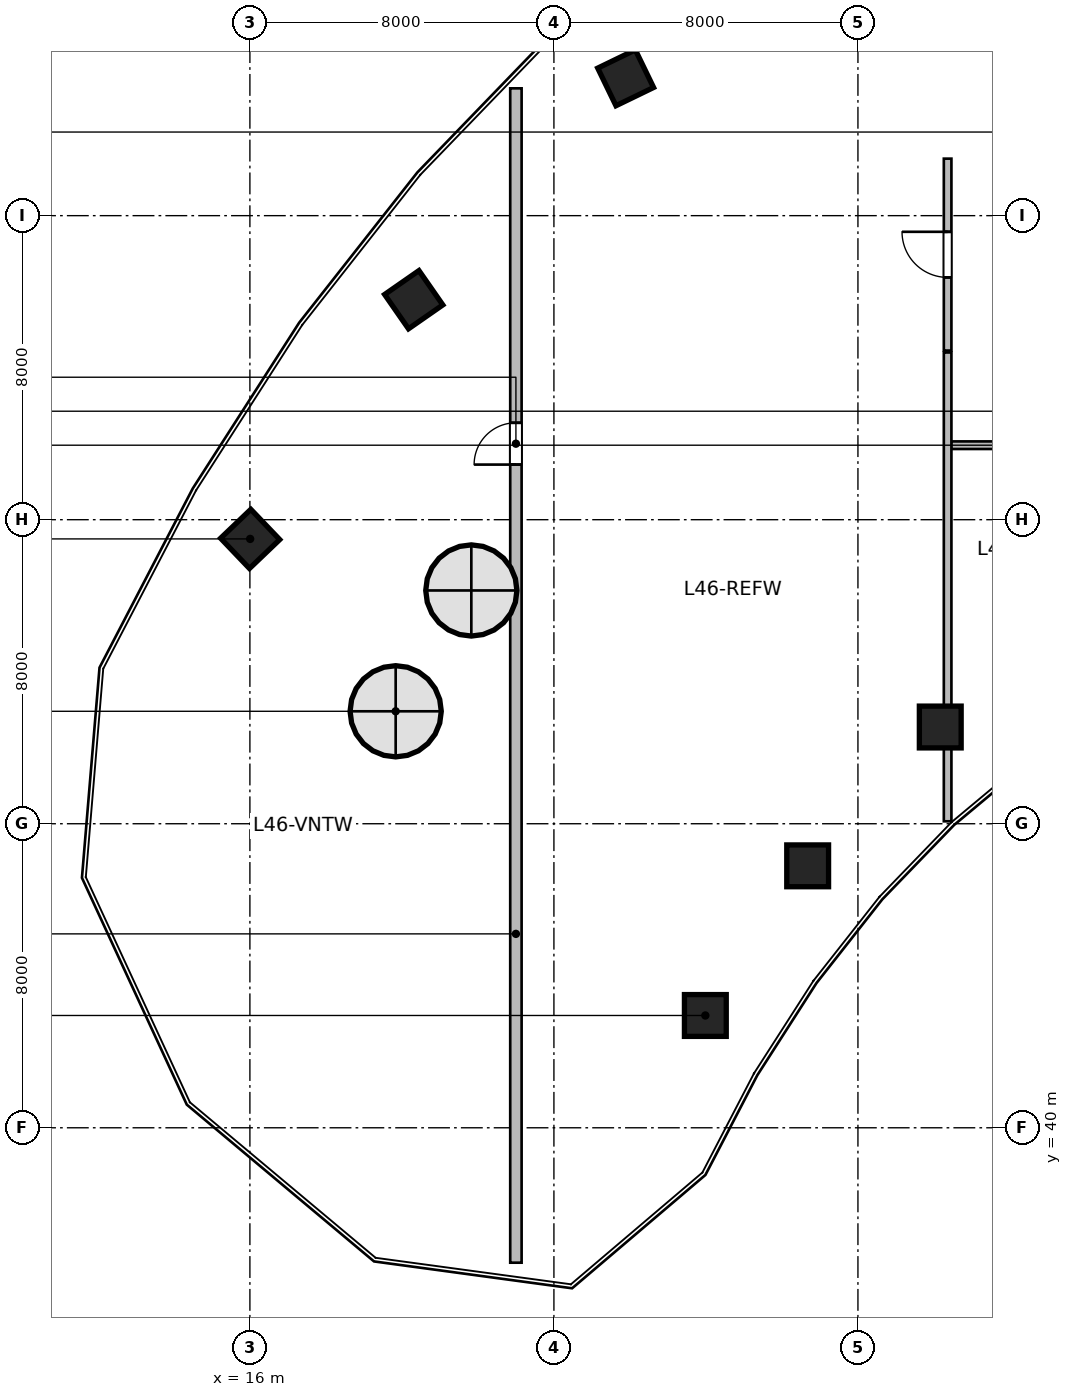
"""IFC4 building model, lengths in metres.
Left out: names, types, materials, properties, quantities, classifications, styles, units other than length and angle.
Written with IfcOpenShell. Run it as: python <this file> out.ifc"""

import sys

from ifc_helpers import new_model, si_unit, direction, frame, frame_2d, origin, origin_2d, place, context, subcontext, project, spatial, rectangle, circle, extrude, source, transform, mapped, element, fill, save


model = new_model("IFC4")
c1 = context("Model", 3, precision=1e-05, world=origin(), true_north=direction((0.0, 1.0)))
c2 = subcontext(c1, "Body", "Model", "MODEL_VIEW")
j1 = project(units=[si_unit("LENGTHUNIT", "METRE"), si_unit("PLANEANGLEUNIT", "RADIAN")], contexts=[c1])
p1 = place(None, origin())
s1 = spatial("IfcSite", under=j1, at=p1, CompositionType="ELEMENT")
p2 = place(p1, origin())
s2 = spatial("IfcBuilding", under=s1, at=p2, CompositionType="ELEMENT")
p3 = place(p2, frame((0.0, 0.0, 189.6)))
s3 = spatial("IfcBuildingStorey", under=s2, at=p3, CompositionType="ELEMENT", Elevation=189.6)
m1 = source(origin(), c2, "Body", "SweptSolid", [
    extrude(circle(Radius=0.55, at=origin_2d()), origin(), (0.0, 0.0, 1.0), 4.8),
])
p4 = place(p3, frame((27.985, 42.955, 0.0), z_axis=(0.0, 0.0, 1.0), x_axis=(-0.690756218984, 0.723087716626, 0.0)))
e1 = element("IfcColumn", 1, at=p4, inside=s3, PredefinedType="COLUMN", context=c2, shape_type="MappedRepresentation", body=[
    mapped(m1, transform((0.0, 0.0, 0.0), scale=1.0)),
])
m2 = source(origin(), c2, "Body", "SweptSolid", [
    extrude(rectangle(XDim=1.1, YDim=1.1, at=origin_2d()), origin(), (0.0, 0.0, 1.0), 4.8),
])
p5 = place(p3, frame((16.007, 55.494, 0.0), z_axis=(0.0, 0.0, 1.0), x_axis=(-0.690756218984, 0.723087716626, 0.0)))
e2 = element("IfcColumn", 2, at=p5, inside=s3, PredefinedType="COLUMN", context=c2, shape_type="MappedRepresentation", body=[
    mapped(m2, transform((0.0, 0.0, 0.0), scale=1.0)),
])
p6 = place(p3, frame((30.677, 46.892, 0.0), z_axis=(0.0, 0.0, 1.0), x_axis=(-0.571143442153, 0.820850271661, 0.0)))
e3 = element("IfcColumn", 3, at=p6, inside=s3, PredefinedType="COLUMN", context=c2, shape_type="MappedRepresentation", body=[
    mapped(m1, transform((0.0, 0.0, 0.0), scale=1.0)),
])
p7 = place(p3, frame((20.311, 61.789, 0.0), z_axis=(0.0, 0.0, 1.0), x_axis=(-0.571143442153, 0.820850271661, 0.0)))
e4 = element("IfcColumn", 4, at=p7, inside=s3, PredefinedType="COLUMN", context=c2, shape_type="MappedRepresentation", body=[
    mapped(m2, transform((0.0, 0.0, 0.0), scale=1.0)),
])
p8 = place(p3, frame((34.166, 50.545, 0.0), z_axis=(0.0, 0.0, 1.0), x_axis=(-0.436173672171, 0.899862504889, 0.0)))
e5 = element("IfcColumn", 5, at=p8, inside=s3, PredefinedType="COLUMN", context=c2, shape_type="MappedRepresentation", body=[
    mapped(m1, transform((0.0, 0.0, 0.0), scale=1.0)),
])
p9 = place(p3, frame((25.888, 67.627, 0.0), z_axis=(0.0, 0.0, 1.0), x_axis=(-0.436173672171, 0.899862504889, 0.0)))
e6 = element("IfcColumn", 6, at=p9, inside=s3, PredefinedType="COLUMN", context=c2, shape_type="MappedRepresentation", body=[
    mapped(m2, transform((0.0, 0.0, 0.0), scale=1.0)),
])
m3 = source(origin(), c2, "Body", "SweptSolid", [
    extrude(rectangle(XDim=30.9, YDim=0.3, at=frame_2d((15.45, 0.0))), origin(), (0.0, 0.0, 1.0), 4.48),
])
p10 = place(p3, frame((23.0, 36.45, 0.0), z_axis=(0.0, 0.0, 1.0), x_axis=(0.0, 1.0, 0.0)))
e7 = element("IfcWall", 7, at=p10, inside=s3, PredefinedType="SOLIDWALL", context=c2, shape_type="MappedRepresentation", body=[
    mapped(m3, transform((0.0, 0.0, 0.0), scale=1.0)),
])
p11 = place(p10, frame((21.0, 0.0, 0.0)))
e8 = element("IfcOpeningElement", 8, at=p11, cuts=e7, PredefinedType="OPENING", context=c2, shape_type="SweptSolid", body=[
    extrude(rectangle(XDim=1.1, YDim=2.15, at=frame_2d((0.55, 1.075))), frame((0.0, 0.16, 0.0), z_axis=(0.0, -1.0, 0.0), x_axis=(1.0, 0.0, 0.0)), (0.0, 0.0, 1.0), 0.32),
])
m4 = source(origin(), c2, "Body", "SweptSolid", [
    extrude(rectangle(XDim=6.55, YDim=0.2, at=frame_2d((3.275, 0.0))), origin(), (0.0, 0.0, 1.0), 4.48),
])
p12 = place(p3, frame((34.45, 57.96, 0.0), z_axis=(0.0, 0.0, 1.0), x_axis=(1.0, 0.0, 0.0)))
e9 = element("IfcWall", 9, at=p12, inside=s3, PredefinedType="SOLIDWALL", context=c2, shape_type="MappedRepresentation", body=[
    mapped(m4, transform((0.0, 0.0, 0.0), scale=1.0)),
])
p13 = place(p12, frame((2.675, 0.0, 0.0)))
e10 = element("IfcOpeningElement", 10, at=p13, cuts=e9, PredefinedType="OPENING", context=c2, shape_type="SweptSolid", body=[
    extrude(rectangle(XDim=1.2, YDim=2.15, at=frame_2d((0.6, 1.075))), frame((0.0, 0.11, 0.0), z_axis=(0.0, -1.0, 0.0), x_axis=(1.0, 0.0, 0.0)), (0.0, 0.0, 1.0), 0.22),
])
m5 = source(origin(), c2, "Body", "SweptSolid", [
    extrude(rectangle(XDim=12.336, YDim=0.2, at=frame_2d((6.168, 0.0))), origin(), (0.0, 0.0, 1.0), 4.48),
])
p14 = place(p3, frame((34.36, 48.064, 0.0), z_axis=(0.0, 0.0, 1.0), x_axis=(0.0, 1.0, 0.0)))
e11 = element("IfcWall", 11, at=p14, inside=s3, PredefinedType="SOLIDWALL", context=c2, shape_type="MappedRepresentation", body=[
    mapped(m5, transform((0.0, 0.0, 0.0), scale=1.0)),
])
m6 = source(origin(), c2, "Body", "SweptSolid", [
    extrude(rectangle(XDim=5.05, YDim=0.2, at=frame_2d((2.525, 0.0))), origin(), (0.0, 0.0, 1.0), 4.48),
])
p15 = place(p3, frame((34.36, 60.45, 0.0), z_axis=(0.0, 0.0, 1.0), x_axis=(0.0, 1.0, 0.0)))
e12 = element("IfcWall", 12, at=p15, inside=s3, PredefinedType="SOLIDWALL", context=c2, shape_type="MappedRepresentation", body=[
    mapped(m6, transform((0.0, 0.0, 0.0), scale=1.0)),
])
p16 = place(p15, frame((1.925, 0.0, 0.0)))
e13 = element("IfcOpeningElement", 13, at=p16, cuts=e12, PredefinedType="OPENING", context=c2, shape_type="SweptSolid", body=[
    extrude(rectangle(XDim=1.2, YDim=2.15, at=frame_2d((0.6, 1.075))), frame((0.0, 0.11, 0.0), z_axis=(0.0, -1.0, 0.0), x_axis=(1.0, 0.0, 0.0)), (0.0, 0.0, 1.0), 0.22),
])
m7 = source(origin(), c2, "Body", "SweptSolid", [
    extrude(rectangle(XDim=1.1, YDim=2.15, at=frame_2d((0.55, 1.075))), frame((0.0, 0.025, 0.0), z_axis=(0.0, -1.0, 0.0), x_axis=(1.0, 0.0, 0.0)), (0.0, 0.0, 1.0), 0.05),
])
p17 = place(p11, origin())
e14 = element("IfcDoor", 14, at=p17, inside=s3, OperationType="SINGLE_SWING_LEFT", PredefinedType="DOOR", context=c2, shape_type="MappedRepresentation", body=[
    mapped(m7, transform((0.0, 0.0, 0.0), scale=1.0)),
])
fill(e8, e14)
m8 = source(origin(), c2, "Body", "SweptSolid", [
    extrude(rectangle(XDim=1.2, YDim=2.15, at=frame_2d((0.6, 1.075))), frame((0.0, 0.025, 0.0), z_axis=(0.0, -1.0, 0.0), x_axis=(1.0, 0.0, 0.0)), (0.0, 0.0, 1.0), 0.05),
])
p18 = place(p16, origin())
e15 = element("IfcDoor", 15, at=p18, inside=s3, OperationType="SINGLE_SWING_RIGHT", PredefinedType="DOOR", context=c2, shape_type="MappedRepresentation", body=[
    mapped(m8, transform((0.0, 0.0, 0.0), scale=1.0)),
])
fill(e13, e15)
save(model, sys.argv[1])
